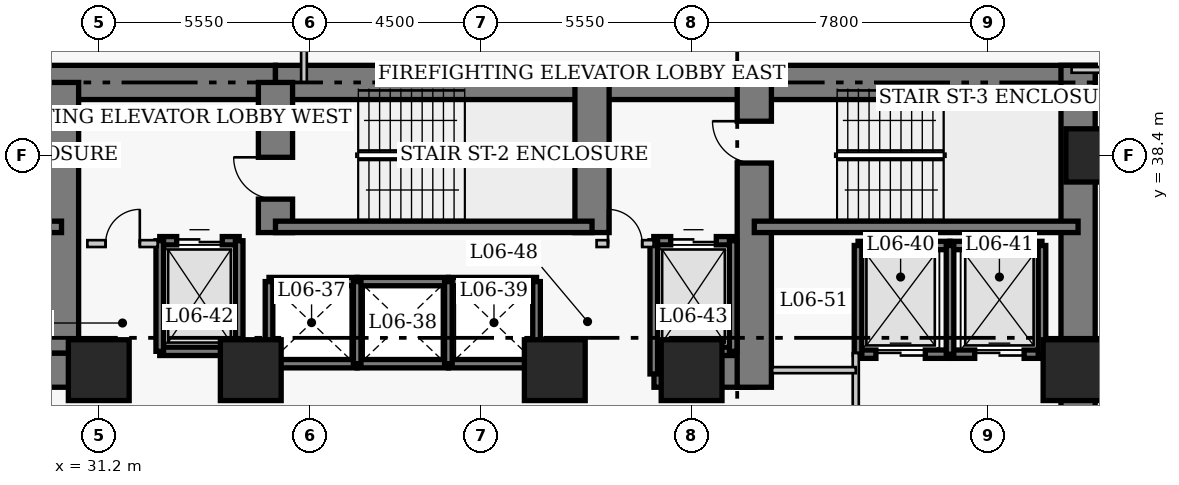
"""IFC4 building model, lengths in metres.
Left out: names, types, materials, properties, quantities, classifications, styles, units other than length and angle.
Written with IfcOpenShell. Run it as: python <this file> out.ifc"""

import sys

from ifc_helpers import new_model, si_unit, direction, frame, frame_2d, origin, origin_2d, place, context, subcontext, project, spatial, rectangle, extrude, element, fill, save


model = new_model("IFC4")
c1 = context("Model", 3, precision=1e-05, world=origin(), true_north=direction((0.0, 1.0)))
c2 = subcontext(c1, "Body", "Model", "MODEL_VIEW")
j1 = project(units=[si_unit("LENGTHUNIT", "METRE"), si_unit("PLANEANGLEUNIT", "RADIAN")], contexts=[c1])
p1 = place(None, origin())
s1 = spatial("IfcSite", under=j1, at=p1, CompositionType="ELEMENT")
p2 = place(p1, origin())
s2 = spatial("IfcBuilding", under=s1, at=p2, CompositionType="ELEMENT")
p3 = place(p2, frame((0.0, 0.0, 29.8)))
s3 = spatial("IfcBuildingStorey", under=s2, at=p3, CompositionType="ELEMENT", Elevation=29.8)
p4 = place(p3, frame((21.45, 40.32, 0.0), z_axis=(0.0, 0.0, 1.0), x_axis=(1.0, 0.0, 0.0)))
e1 = element("IfcWall", 1, at=p4, inside=s3, PredefinedType="SHEAR", context=c2, shape_type="SweptSolid", body=[
    extrude(rectangle(XDim=14.4, YDim=0.9, at=frame_2d((7.2, 0.0))), origin(), (0.0, 0.0, 1.0), 3.8),
])
p5 = place(p3, frame((35.85, 40.32, 0.0), z_axis=(0.0, 0.0, 1.0), x_axis=(1.0, 0.0, 0.0)))
e2 = element("IfcWall", 2, at=p5, inside=s3, PredefinedType="SHEAR", context=c2, shape_type="SweptSolid", body=[
    extrude(rectangle(XDim=12.6, YDim=0.9, at=frame_2d((6.3, 0.0))), origin(), (0.0, 0.0, 1.0), 3.8),
])
p6 = place(p3, frame((48.45, 40.32, 0.0), z_axis=(0.0, 0.0, 1.0), x_axis=(1.0, 0.0, 0.0)))
e3 = element("IfcWall", 3, at=p6, inside=s3, PredefinedType="SHEAR", context=c2, shape_type="SweptSolid", body=[
    extrude(rectangle(XDim=8.97, YDim=0.9, at=frame_2d((4.485, 0.0))), origin(), (0.0, 0.0, 1.0), 3.8),
])
p7 = place(p3, frame((56.97, 27.05, 0.0), z_axis=(0.0, 0.0, 1.0), x_axis=(0.0, 1.0, 0.0)))
e4 = element("IfcWall", 4, at=p7, inside=s3, PredefinedType="SHEAR", context=c2, shape_type="SweptSolid", body=[
    extrude(rectangle(XDim=13.72, YDim=0.9, at=frame_2d((6.86, 0.0))), origin(), (0.0, 0.0, 1.0), 3.8),
])
p8 = place(p3, frame((28.45, 32.75, 0.0), z_axis=(0.0, 0.0, 1.0), x_axis=(1.0, 0.0, 0.0)))
e5 = element("IfcWall", 5, at=p8, inside=s3, PredefinedType="SHEAR", context=c2, shape_type="SweptSolid", body=[
    extrude(rectangle(XDim=2.4, YDim=0.9, at=frame_2d((1.2, 0.0))), origin(), (0.0, 0.0, 1.0), 3.8),
])
p9 = place(p3, frame((45.81, 32.75, 0.0), z_axis=(0.0, 0.0, 1.0), x_axis=(1.0, 0.0, 0.0)))
e6 = element("IfcWall", 6, at=p9, inside=s3, PredefinedType="SHEAR", context=c2, shape_type="SweptSolid", body=[
    extrude(rectangle(XDim=2.64, YDim=0.9, at=frame_2d((1.32, 0.0))), origin(), (0.0, 0.0, 1.0), 3.8),
])
p10 = place(p3, frame((30.22, 33.2, 0.0), z_axis=(0.0, 0.0, 1.0), x_axis=(0.0, 1.0, 0.0)))
e7 = element("IfcWall", 7, at=p10, inside=s3, PredefinedType="SHEAR", context=c2, shape_type="SweptSolid", body=[
    extrude(rectangle(XDim=7.12, YDim=0.9, at=frame_2d((3.56, 0.0))), origin(), (0.0, 0.0, 1.0), 3.8),
])
p11 = place(p3, frame((35.85, 36.37, 0.0), z_axis=(0.0, 0.0, 1.0), x_axis=(0.0, 1.0, 0.0)))
e8 = element("IfcWall", 8, at=p11, inside=s3, PredefinedType="SHEAR", context=c2, shape_type="SweptSolid", body=[
    extrude(rectangle(XDim=3.95, YDim=0.9, at=frame_2d((1.975, 0.0))), origin(), (0.0, 0.0, 1.0), 3.8),
])
p12 = place(p11, frame((0.88, 0.0, 0.0)))
e9 = element("IfcOpeningElement", 9, at=p12, cuts=e8, PredefinedType="OPENING", context=c2, shape_type="SweptSolid", body=[
    extrude(rectangle(XDim=1.1, YDim=2.15, at=frame_2d((0.55, 1.075))), frame((0.0, 0.46, 0.0), z_axis=(0.0, -1.0, 0.0), x_axis=(1.0, 0.0, 0.0)), (0.0, 0.0, 1.0), 0.92),
])
p13 = place(p3, frame((44.18, 36.37, 0.0), z_axis=(0.0, 0.0, 1.0), x_axis=(0.0, 1.0, 0.0)))
e10 = element("IfcWall", 10, at=p13, inside=s3, PredefinedType="SHEAR", context=c2, shape_type="SweptSolid", body=[
    extrude(rectangle(XDim=3.95, YDim=0.9, at=frame_2d((1.975, 0.0))), origin(), (0.0, 0.0, 1.0), 3.8),
])
p14 = place(p3, frame((48.45, 32.3, 0.0), z_axis=(0.0, 0.0, 1.0), x_axis=(0.0, 1.0, 0.0)))
e11 = element("IfcWall", 11, at=p14, inside=s3, PredefinedType="SHEAR", context=c2, shape_type="SweptSolid", body=[
    extrude(rectangle(XDim=8.02, YDim=0.9, at=frame_2d((4.01, 0.0))), origin(), (0.0, 0.0, 1.0), 3.8),
])
p15 = place(p14, frame((5.9, 0.0, 0.0)))
e12 = element("IfcOpeningElement", 12, at=p15, cuts=e11, PredefinedType="OPENING", context=c2, shape_type="SweptSolid", body=[
    extrude(rectangle(XDim=1.1, YDim=2.15, at=frame_2d((0.55, 1.075))), frame((0.0, 0.46, 0.0), z_axis=(0.0, -1.0, 0.0), x_axis=(1.0, 0.0, 0.0)), (0.0, 0.0, 1.0), 0.92),
])
p16 = place(p3, frame((21.9, 36.52, 0.0), z_axis=(0.0, 0.0, 1.0), x_axis=(1.0, 0.0, 0.0)))
e13 = element("IfcWall", 13, at=p16, inside=s3, PredefinedType="SHEAR", context=c2, shape_type="SweptSolid", body=[
    extrude(rectangle(XDim=8.32, YDim=0.3, at=frame_2d((4.16, 0.0))), origin(), (0.0, 0.0, 1.0), 3.8),
])
p17 = place(p16, frame((0.9, 0.0, 0.0)))
e14 = element("IfcOpeningElement", 14, at=p17, cuts=e13, PredefinedType="OPENING", context=c2, shape_type="SweptSolid", body=[
    extrude(rectangle(XDim=1.1, YDim=2.15, at=frame_2d((0.55, 1.075))), frame((0.0, 0.16, 0.0), z_axis=(0.0, -1.0, 0.0), x_axis=(1.0, 0.0, 0.0)), (0.0, 0.0, 1.0), 0.32),
])
p18 = place(p3, frame((35.85, 36.52, 0.0), z_axis=(0.0, 0.0, 1.0), x_axis=(1.0, 0.0, 0.0)))
e15 = element("IfcWall", 15, at=p18, inside=s3, PredefinedType="SHEAR", context=c2, shape_type="SweptSolid", body=[
    extrude(rectangle(XDim=8.33, YDim=0.3, at=frame_2d((4.165, 0.0))), origin(), (0.0, 0.0, 1.0), 3.8),
])
p19 = place(p3, frame((48.45, 36.52, 0.0), z_axis=(0.0, 0.0, 1.0), x_axis=(1.0, 0.0, 0.0)))
e16 = element("IfcWall", 16, at=p19, inside=s3, PredefinedType="SHEAR", context=c2, shape_type="SweptSolid", body=[
    extrude(rectangle(XDim=8.52, YDim=0.3, at=frame_2d((4.26, 0.0))), origin(), (0.0, 0.0, 1.0), 3.8),
])
p20 = place(p3, frame((57.35, 38.4, 0.0), z_axis=(0.0, 0.0, 1.0), x_axis=(1.0, 0.0, 0.0)))
e17 = element("IfcColumn", 17, at=p20, inside=s3, PredefinedType="COLUMN", context=c2, shape_type="SweptSolid", body=[
    extrude(rectangle(XDim=1.4, YDim=1.4, at=origin_2d()), origin(), (0.0, 0.0, 1.0), 3.8),
])
for number, where, z_axis, x_axis in (
    (18, (31.2, 32.75, 0.0), (0.0, 0.0, 1.0), (1.0, 0.0, 0.0)),
    (19, (35.2, 32.75, 0.0), (0.0, 0.0, 1.0), (1.0, 0.0, 0.0)),
    (20, (43.2, 32.75, 0.0), (0.0, 0.0, 1.0), (1.0, 0.0, 0.0)),
    (21, (46.8, 32.75, 0.0), (0.0, 0.0, 1.0), (1.0, 0.0, 0.0)),
    (22, (56.85, 32.75, 0.0), (0.0, 0.0, 1.0), (1.0, 0.0, 0.0)),
):
    element("IfcColumn", number, at=place(p3, frame(where, z_axis=z_axis, x_axis=x_axis)), inside=s3, PredefinedType="COLUMN", context=c2, shape_type="SweptSolid", body=[
        extrude(rectangle(XDim=1.6, YDim=1.6, at=origin_2d()), origin(), (0.0, 0.0, 1.0), 3.8),
    ])
for number, where, z_axis, x_axis in (
    (23, (35.68, 35.08, 0.0), (0.0, 0.0, 1.0), (1.0, 0.0, 0.0)),
    (24, (35.68, 32.92, 0.0), (0.0, 0.0, 1.0), (1.0, 0.0, 0.0)),
):
    element("IfcWall", number, at=place(p3, frame(where, z_axis=z_axis, x_axis=x_axis)), inside=s3, PredefinedType="SHEAR", context=c2, shape_type="SweptSolid", body=[
        extrude(rectangle(XDim=2.32, YDim=0.22, at=frame_2d((1.16, 0.0))), origin(), (0.0, 0.0, 1.0), 3.8),
    ])
p21 = place(p3, frame((35.68, 32.92, 0.0), z_axis=(0.0, 0.0, 1.0), x_axis=(0.0, 1.0, 0.0)))
e25 = element("IfcWall", 25, at=p21, inside=s3, PredefinedType="SHEAR", context=c2, shape_type="SweptSolid", body=[
    extrude(rectangle(XDim=2.16, YDim=0.2, at=frame_2d((1.08, 0.0))), origin(), (0.0, 0.0, 1.0), 3.8),
])
for number, where, z_axis, x_axis in (
    (26, (38.0, 35.08, 0.0), (0.0, 0.0, 1.0), (1.0, 0.0, 0.0)),
    (27, (38.0, 32.92, 0.0), (0.0, 0.0, 1.0), (1.0, 0.0, 0.0)),
):
    element("IfcWall", number, at=place(p3, frame(where, z_axis=z_axis, x_axis=x_axis)), inside=s3, PredefinedType="SHEAR", context=c2, shape_type="SweptSolid", body=[
        extrude(rectangle(XDim=2.4, YDim=0.22, at=frame_2d((1.2, 0.0))), origin(), (0.0, 0.0, 1.0), 3.8),
    ])
p22 = place(p3, frame((38.0, 32.92, 0.0), z_axis=(0.0, 0.0, 1.0), x_axis=(0.0, 1.0, 0.0)))
e28 = element("IfcWall", 28, at=p22, inside=s3, PredefinedType="SHEAR", context=c2, shape_type="SweptSolid", body=[
    extrude(rectangle(XDim=2.16, YDim=0.2, at=frame_2d((1.08, 0.0))), origin(), (0.0, 0.0, 1.0), 3.8),
])
for number, where, z_axis, x_axis in (
    (29, (40.4, 35.08, 0.0), (0.0, 0.0, 1.0), (1.0, 0.0, 0.0)),
    (30, (40.4, 32.92, 0.0), (0.0, 0.0, 1.0), (1.0, 0.0, 0.0)),
):
    element("IfcWall", number, at=place(p3, frame(where, z_axis=z_axis, x_axis=x_axis)), inside=s3, PredefinedType="SHEAR", context=c2, shape_type="SweptSolid", body=[
        extrude(rectangle(XDim=2.32, YDim=0.22, at=frame_2d((1.16, 0.0))), origin(), (0.0, 0.0, 1.0), 3.8),
    ])
for number, where, z_axis, x_axis in (
    (31, (40.4, 32.92, 0.0), (0.0, 0.0, 1.0), (0.0, 1.0, 0.0)),
    (32, (42.72, 32.92, 0.0), (0.0, 0.0, 1.0), (0.0, 1.0, 0.0)),
):
    element("IfcWall", number, at=place(p3, frame(where, z_axis=z_axis, x_axis=x_axis)), inside=s3, PredefinedType="SHEAR", context=c2, shape_type="SweptSolid", body=[
        extrude(rectangle(XDim=2.16, YDim=0.2, at=frame_2d((1.08, 0.0))), origin(), (0.0, 0.0, 1.0), 3.8),
    ])
p23 = place(p3, frame((51.18, 36.03, 0.0), z_axis=(0.0, 0.0, 1.0), x_axis=(1.0, 0.0, 0.0)))
e33 = element("IfcWall", 33, at=p23, inside=s3, PredefinedType="SHEAR", context=c2, shape_type="SweptSolid", body=[
    extrude(rectangle(XDim=2.42, YDim=0.22, at=frame_2d((1.21, 0.0))), origin(), (0.0, 0.0, 1.0), 3.8),
])
p24 = place(p3, frame((51.18, 33.17, 0.0), z_axis=(0.0, 0.0, 1.0), x_axis=(1.0, 0.0, 0.0)))
e34 = element("IfcWall", 34, at=p24, inside=s3, PredefinedType="SHEAR", context=c2, shape_type="SweptSolid", body=[
    extrude(rectangle(XDim=2.42, YDim=0.22, at=frame_2d((1.21, 0.0))), origin(), (0.0, 0.0, 1.0), 3.8),
])
p25 = place(p24, frame((0.47, 0.0, 0.0)))
e35 = element("IfcOpeningElement", 35, at=p25, cuts=e34, PredefinedType="OPENING", context=c2, shape_type="SweptSolid", body=[
    extrude(rectangle(XDim=1.3, YDim=2.15, at=frame_2d((0.65, 1.075))), frame((0.0, 0.12, 0.0), z_axis=(0.0, -1.0, 0.0), x_axis=(1.0, 0.0, 0.0)), (0.0, 0.0, 1.0), 0.24),
])
p26 = place(p3, frame((51.18, 33.17, 0.0), z_axis=(0.0, 0.0, 1.0), x_axis=(0.0, 1.0, 0.0)))
e36 = element("IfcWall", 36, at=p26, inside=s3, PredefinedType="SHEAR", context=c2, shape_type="SweptSolid", body=[
    extrude(rectangle(XDim=2.86, YDim=0.2, at=frame_2d((1.43, 0.0))), origin(), (0.0, 0.0, 1.0), 3.8),
])
p27 = place(p3, frame((53.6, 36.03, 0.0), z_axis=(0.0, 0.0, 1.0), x_axis=(1.0, 0.0, 0.0)))
e37 = element("IfcWall", 37, at=p27, inside=s3, PredefinedType="SHEAR", context=c2, shape_type="SweptSolid", body=[
    extrude(rectangle(XDim=2.42, YDim=0.22, at=frame_2d((1.21, 0.0))), origin(), (0.0, 0.0, 1.0), 3.8),
])
p28 = place(p3, frame((53.6, 33.17, 0.0), z_axis=(0.0, 0.0, 1.0), x_axis=(1.0, 0.0, 0.0)))
e38 = element("IfcWall", 38, at=p28, inside=s3, PredefinedType="SHEAR", context=c2, shape_type="SweptSolid", body=[
    extrude(rectangle(XDim=2.42, YDim=0.22, at=frame_2d((1.21, 0.0))), origin(), (0.0, 0.0, 1.0), 3.8),
])
p29 = place(p28, frame((0.65, 0.0, 0.0)))
e39 = element("IfcOpeningElement", 39, at=p29, cuts=e38, PredefinedType="OPENING", context=c2, shape_type="SweptSolid", body=[
    extrude(rectangle(XDim=1.3, YDim=2.15, at=frame_2d((0.65, 1.075))), frame((0.0, 0.12, 0.0), z_axis=(0.0, -1.0, 0.0), x_axis=(1.0, 0.0, 0.0)), (0.0, 0.0, 1.0), 0.24),
])
for number, where, z_axis, x_axis in (
    (40, (53.6, 33.17, 0.0), (0.0, 0.0, 1.0), (0.0, 1.0, 0.0)),
    (41, (56.02, 33.17, 0.0), (0.0, 0.0, 1.0), (0.0, 1.0, 0.0)),
):
    element("IfcWall", number, at=place(p3, frame(where, z_axis=z_axis, x_axis=x_axis)), inside=s3, PredefinedType="SHEAR", context=c2, shape_type="SweptSolid", body=[
        extrude(rectangle(XDim=2.86, YDim=0.2, at=frame_2d((1.43, 0.0))), origin(), (0.0, 0.0, 1.0), 3.8),
    ])
p30 = place(p3, frame((32.805, 36.155, 0.0), z_axis=(0.0, 0.0, 1.0), x_axis=(1.0, 0.0, 0.0)))
e42 = element("IfcWall", 42, at=p30, inside=s3, PredefinedType="SHEAR", context=c2, shape_type="SweptSolid", body=[
    extrude(rectangle(XDim=2.09, YDim=0.22, at=frame_2d((1.045, 0.0))), origin(), (0.0, 0.0, 1.0), 3.8),
])
p31 = place(p30, frame((0.445, 0.0, 0.0)))
e43 = element("IfcOpeningElement", 43, at=p31, cuts=e42, PredefinedType="OPENING", context=c2, shape_type="SweptSolid", body=[
    extrude(rectangle(XDim=1.2, YDim=2.15, at=frame_2d((0.6, 1.075))), frame((0.0, 0.12, 0.0), z_axis=(0.0, -1.0, 0.0), x_axis=(1.0, 0.0, 0.0)), (0.0, 0.0, 1.0), 0.24),
])
p32 = place(p3, frame((32.805, 33.245, 0.0), z_axis=(0.0, 0.0, 1.0), x_axis=(1.0, 0.0, 0.0)))
e44 = element("IfcWall", 44, at=p32, inside=s3, PredefinedType="SHEAR", context=c2, shape_type="SweptSolid", body=[
    extrude(rectangle(XDim=2.09, YDim=0.22, at=frame_2d((1.045, 0.0))), origin(), (0.0, 0.0, 1.0), 3.8),
])
for number, where, z_axis, x_axis in (
    (45, (32.805, 33.245, 0.0), (0.0, 0.0, 1.0), (0.0, 1.0, 0.0)),
    (46, (34.895, 33.245, 0.0), (0.0, 0.0, 1.0), (0.0, 1.0, 0.0)),
):
    element("IfcWall", number, at=place(p3, frame(where, z_axis=z_axis, x_axis=x_axis)), inside=s3, PredefinedType="SHEAR", context=c2, shape_type="SweptSolid", body=[
        extrude(rectangle(XDim=2.91, YDim=0.2, at=frame_2d((1.455, 0.0))), origin(), (0.0, 0.0, 1.0), 3.8),
    ])
p33 = place(p3, frame((45.805, 36.155, 0.0), z_axis=(0.0, 0.0, 1.0), x_axis=(1.0, 0.0, 0.0)))
e47 = element("IfcWall", 47, at=p33, inside=s3, PredefinedType="SHEAR", context=c2, shape_type="SweptSolid", body=[
    extrude(rectangle(XDim=2.09, YDim=0.22, at=frame_2d((1.045, 0.0))), origin(), (0.0, 0.0, 1.0), 3.8),
])
p34 = place(p33, frame((0.445, 0.0, 0.0)))
e48 = element("IfcOpeningElement", 48, at=p34, cuts=e47, PredefinedType="OPENING", context=c2, shape_type="SweptSolid", body=[
    extrude(rectangle(XDim=1.2, YDim=2.15, at=frame_2d((0.6, 1.075))), frame((0.0, 0.12, 0.0), z_axis=(0.0, -1.0, 0.0), x_axis=(1.0, 0.0, 0.0)), (0.0, 0.0, 1.0), 0.24),
])
p35 = place(p3, frame((45.805, 33.245, 0.0), z_axis=(0.0, 0.0, 1.0), x_axis=(1.0, 0.0, 0.0)))
e49 = element("IfcWall", 49, at=p35, inside=s3, PredefinedType="SHEAR", context=c2, shape_type="SweptSolid", body=[
    extrude(rectangle(XDim=2.09, YDim=0.22, at=frame_2d((1.045, 0.0))), origin(), (0.0, 0.0, 1.0), 3.8),
])
p36 = place(p3, frame((45.805, 32.65, 0.0), z_axis=(0.0, 0.0, 1.0), x_axis=(0.0, 1.0, 0.0)))
e50 = element("IfcWall", 50, at=p36, inside=s3, PredefinedType="SHEAR", context=c2, shape_type="SweptSolid", body=[
    extrude(rectangle(XDim=3.505, YDim=0.2, at=frame_2d((1.752, 0.0))), origin(), (0.0, 0.0, 1.0), 3.8),
])
p37 = place(p3, frame((47.895, 33.245, 0.0), z_axis=(0.0, 0.0, 1.0), x_axis=(0.0, 1.0, 0.0)))
e51 = element("IfcWall", 51, at=p37, inside=s3, PredefinedType="SHEAR", context=c2, shape_type="SweptSolid", body=[
    extrude(rectangle(XDim=2.91, YDim=0.2, at=frame_2d((1.455, 0.0))), origin(), (0.0, 0.0, 1.0), 3.8),
])
p38 = place(p3, frame((30.9, 36.08, 0.0), z_axis=(0.0, 0.0, 1.0), x_axis=(1.0, 0.0, 0.0)))
e52 = element("IfcWall", 52, at=p38, inside=s3, PredefinedType="PARTITIONING", context=c2, shape_type="SweptSolid", body=[
    extrude(rectangle(XDim=1.85, YDim=0.18, at=frame_2d((0.925, 0.0))), origin(), (0.0, 0.0, 1.0), 3.54),
])
p39 = place(p38, frame((0.48, 0.0, 0.0)))
e53 = element("IfcOpeningElement", 53, at=p39, cuts=e52, PredefinedType="OPENING", context=c2, shape_type="SweptSolid", body=[
    extrude(rectangle(XDim=0.9, YDim=2.15, at=frame_2d((0.45, 1.075))), frame((0.0, 0.1, 0.0), z_axis=(0.0, -1.0, 0.0), x_axis=(1.0, 0.0, 0.0)), (0.0, 0.0, 1.0), 0.2),
])
p40 = place(p3, frame((44.3, 36.08, 0.0), z_axis=(0.0, 0.0, 1.0), x_axis=(1.0, 0.0, 0.0)))
e54 = element("IfcWall", 54, at=p40, inside=s3, PredefinedType="PARTITIONING", context=c2, shape_type="SweptSolid", body=[
    extrude(rectangle(XDim=1.5, YDim=0.18, at=frame_2d((0.75, 0.0))), origin(), (0.0, 0.0, 1.0), 3.54),
])
p41 = place(p40, frame((0.3, 0.0, 0.0)))
e55 = element("IfcOpeningElement", 55, at=p41, cuts=e54, PredefinedType="OPENING", context=c2, shape_type="SweptSolid", body=[
    extrude(rectangle(XDim=0.9, YDim=2.15, at=frame_2d((0.45, 1.075))), frame((0.0, 0.1, 0.0), z_axis=(0.0, -1.0, 0.0), x_axis=(1.0, 0.0, 0.0)), (0.0, 0.0, 1.0), 0.2),
])
p42 = place(p3, frame((51.12, 29.5, 0.0), z_axis=(0.0, 0.0, 1.0), x_axis=(0.0, 1.0, 0.0)))
e56 = element("IfcWall", 56, at=p42, inside=s3, PredefinedType="PARTITIONING", context=c2, shape_type="SweptSolid", body=[
    extrude(rectangle(XDim=3.7, YDim=0.16, at=frame_2d((1.85, 0.0))), origin(), (0.0, 0.0, 1.0), 3.54),
])
p43 = place(p42, frame((0.9, 0.0, 0.0)))
e57 = element("IfcOpeningElement", 57, at=p43, cuts=e56, PredefinedType="OPENING", context=c2, shape_type="SweptSolid", body=[
    extrude(rectangle(XDim=1.1, YDim=2.15, at=frame_2d((0.55, 1.075))), frame((0.0, 0.09, 0.0), z_axis=(0.0, -1.0, 0.0), x_axis=(1.0, 0.0, 0.0)), (0.0, 0.0, 1.0), 0.18),
])
p44 = place(p3, frame((48.92, 32.75, 0.0), z_axis=(0.0, 0.0, 1.0), x_axis=(1.0, 0.0, 0.0)))
e58 = element("IfcWall", 58, at=p44, inside=s3, PredefinedType="PARTITIONING", context=c2, shape_type="SweptSolid", body=[
    extrude(rectangle(XDim=2.2, YDim=0.16, at=frame_2d((1.1, 0.0))), origin(), (0.0, 0.0, 1.0), 3.54),
])
p45 = place(p3, frame((56.8, 40.65, 0.0), z_axis=(0.0, 0.0, 1.0), x_axis=(1.0, 0.0, 0.0)))
e59 = element("IfcWall", 59, at=p45, inside=s3, PredefinedType="PARTITIONING", context=c2, shape_type="SweptSolid", body=[
    extrude(rectangle(XDim=4.01, YDim=0.15, at=frame_2d((2.005, 0.0))), origin(), (0.0, 0.0, 1.0), 3.54),
])
p46 = place(p45, frame((2.4, 0.0, 0.0)))
e60 = element("IfcOpeningElement", 60, at=p46, cuts=e59, PredefinedType="OPENING", context=c2, shape_type="SweptSolid", body=[
    extrude(rectangle(XDim=1.0, YDim=2.15, at=frame_2d((0.5, 1.075))), frame((0.0, 0.085, 0.0), z_axis=(0.0, -1.0, 0.0), x_axis=(1.0, 0.0, 0.0)), (0.0, 0.0, 1.0), 0.17),
])
p47 = place(p3, frame((36.6, 40.32, 0.0), z_axis=(0.0, 0.0, 1.0), x_axis=(0.0, 1.0, 0.0)))
e61 = element("IfcWall", 61, at=p47, inside=s3, PredefinedType="PARTITIONING", context=c2, shape_type="SweptSolid", body=[
    extrude(rectangle(XDim=5.045, YDim=0.15, at=frame_2d((2.522, 0.0))), origin(), (0.0, 0.0, 1.0), 3.54),
])
p48 = place(p25, origin())
e62 = element("IfcDoor", 62, at=p48, inside=s3, OperationType="DOUBLE_DOOR_SLIDING", PredefinedType="DOOR", context=c2, shape_type="SweptSolid", body=[
    extrude(rectangle(XDim=1.3, YDim=2.15, at=frame_2d((0.65, 1.075))), frame((0.0, 0.025, 0.0), z_axis=(0.0, -1.0, 0.0), x_axis=(1.0, 0.0, 0.0)), (0.0, 0.0, 1.0), 0.05),
])
fill(e35, e62)
p49 = place(p29, origin())
e63 = element("IfcDoor", 63, at=p49, inside=s3, OperationType="DOUBLE_DOOR_SLIDING", PredefinedType="DOOR", context=c2, shape_type="SweptSolid", body=[
    extrude(rectangle(XDim=1.3, YDim=2.15, at=frame_2d((0.65, 1.075))), frame((0.0, 0.025, 0.0), z_axis=(0.0, -1.0, 0.0), x_axis=(1.0, 0.0, 0.0)), (0.0, 0.0, 1.0), 0.05),
])
fill(e39, e63)
p50 = place(p31, origin())
e64 = element("IfcDoor", 64, at=p50, inside=s3, OperationType="DOUBLE_DOOR_SLIDING", PredefinedType="DOOR", context=c2, shape_type="SweptSolid", body=[
    extrude(rectangle(XDim=1.2, YDim=2.15, at=frame_2d((0.6, 1.075))), frame((0.0, 0.025, 0.0), z_axis=(0.0, -1.0, 0.0), x_axis=(1.0, 0.0, 0.0)), (0.0, 0.0, 1.0), 0.05),
])
fill(e43, e64)
p51 = place(p34, origin())
e65 = element("IfcDoor", 65, at=p51, inside=s3, OperationType="DOUBLE_DOOR_SLIDING", PredefinedType="DOOR", context=c2, shape_type="SweptSolid", body=[
    extrude(rectangle(XDim=1.2, YDim=2.15, at=frame_2d((0.6, 1.075))), frame((0.0, 0.025, 0.0), z_axis=(0.0, -1.0, 0.0), x_axis=(1.0, 0.0, 0.0)), (0.0, 0.0, 1.0), 0.05),
])
fill(e48, e65)
p52 = place(p39, origin())
e66 = element("IfcDoor", 66, at=p52, inside=s3, OperationType="SINGLE_SWING_RIGHT", PredefinedType="DOOR", context=c2, shape_type="SweptSolid", body=[
    extrude(rectangle(XDim=0.9, YDim=2.15, at=frame_2d((0.45, 1.075))), frame((0.0, 0.025, 0.0), z_axis=(0.0, -1.0, 0.0), x_axis=(1.0, 0.0, 0.0)), (0.0, 0.0, 1.0), 0.05),
])
fill(e53, e66)
p53 = place(p41, origin())
e67 = element("IfcDoor", 67, at=p53, inside=s3, OperationType="SINGLE_SWING_LEFT", PredefinedType="DOOR", context=c2, shape_type="SweptSolid", body=[
    extrude(rectangle(XDim=0.9, YDim=2.15, at=frame_2d((0.45, 1.075))), frame((0.0, 0.025, 0.0), z_axis=(0.0, -1.0, 0.0), x_axis=(1.0, 0.0, 0.0)), (0.0, 0.0, 1.0), 0.05),
])
fill(e55, e67)
p54 = place(p12, origin())
e68 = element("IfcDoor", 68, at=p54, inside=s3, OperationType="SINGLE_SWING_RIGHT", PredefinedType="DOOR", context=c2, shape_type="SweptSolid", body=[
    extrude(rectangle(XDim=1.1, YDim=2.15, at=frame_2d((0.55, 1.075))), frame((0.0, 0.025, 0.0), z_axis=(0.0, -1.0, 0.0), x_axis=(1.0, 0.0, 0.0)), (0.0, 0.0, 1.0), 0.05),
])
fill(e9, e68)
p55 = place(p15, origin())
e69 = element("IfcDoor", 69, at=p55, inside=s3, OperationType="SINGLE_SWING_RIGHT", PredefinedType="DOOR", context=c2, shape_type="SweptSolid", body=[
    extrude(rectangle(XDim=1.1, YDim=2.15, at=frame_2d((0.55, 1.075))), frame((0.0, 0.025, 0.0), z_axis=(0.0, -1.0, 0.0), x_axis=(1.0, 0.0, 0.0)), (0.0, 0.0, 1.0), 0.05),
])
fill(e12, e69)
save(model, sys.argv[1])
